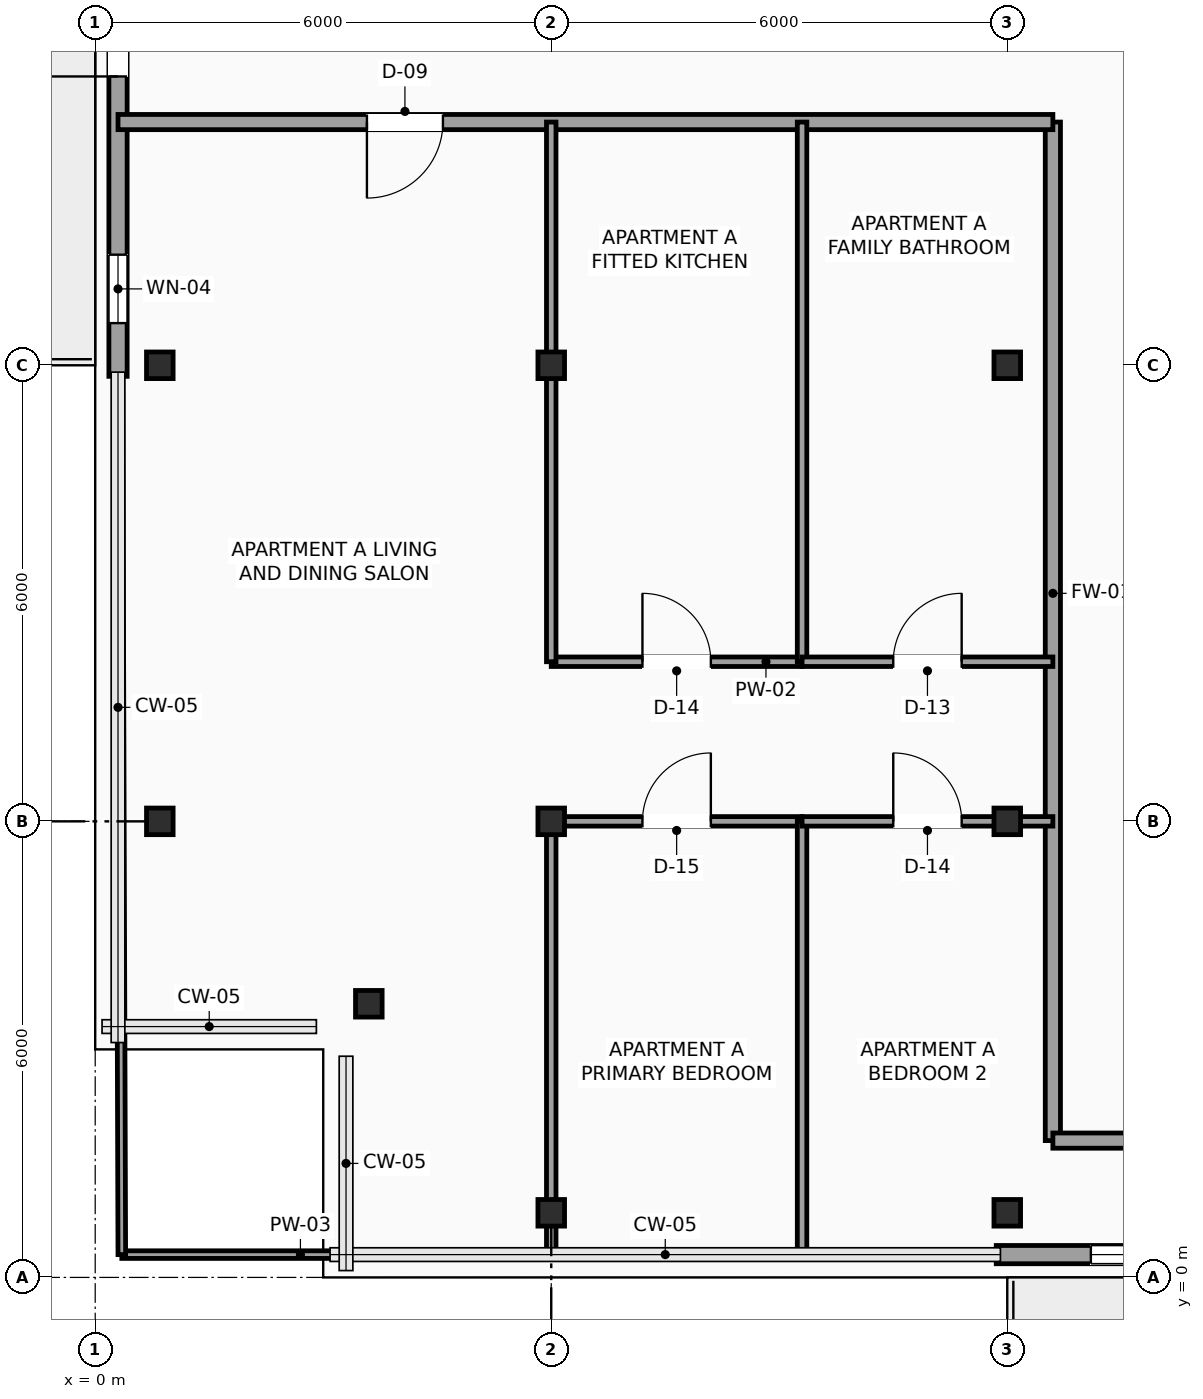
"""IFC4 building model, lengths in metres.
Left out: names, types, materials, properties, quantities, classifications, styles, units other than length and angle.
Written with IfcOpenShell. Run it as: python <this file> out.ifc"""

import sys

from ifc_helpers import new_model, si_unit, direction, frame, frame_2d, origin, origin_2d, place, context, subcontext, project, spatial, rectangle, hollow_rectangle, extrude, element, fill, save


model = new_model("IFC4")
c1 = context("Model", 3, precision=1e-05, world=origin(), true_north=direction((0.0, 1.0)))
c2 = subcontext(c1, "Body", "Model", "MODEL_VIEW")
j1 = project(units=[si_unit("LENGTHUNIT", "METRE"), si_unit("PLANEANGLEUNIT", "RADIAN")], contexts=[c1])
p1 = place(None, origin())
s1 = spatial("IfcSite", under=j1, at=p1, CompositionType="ELEMENT")
p2 = place(p1, origin())
s2 = spatial("IfcBuilding", under=s1, at=p2, CompositionType="ELEMENT")
p3 = place(p2, frame((0.0, 0.0, 250.2)))
s3 = spatial("IfcBuildingStorey", under=s2, at=p3, CompositionType="ELEMENT", Elevation=250.2)
for number, where, z_axis, x_axis in (
    (1, (3.6, 3.6, 0.0), (0.0, 0.0, 1.0), (1.0, 0.0, 0.0)),
    (2, (0.85, 6.0, 0.0), (0.0, 0.0, 1.0), (1.0, 0.0, 0.0)),
    (3, (0.85, 12.0, 0.0), (0.0, 0.0, 1.0), (1.0, 0.0, 0.0)),
    (4, (6.0, 0.85, 0.0), (0.0, 0.0, 1.0), (1.0, 0.0, 0.0)),
    (5, (6.0, 6.0, 0.0), (0.0, 0.0, 1.0), (1.0, 0.0, 0.0)),
    (6, (6.0, 12.0, 0.0), (0.0, 0.0, 1.0), (1.0, 0.0, 0.0)),
    (7, (12.0, 0.85, 0.0), (0.0, 0.0, 1.0), (1.0, 0.0, 0.0)),
    (8, (12.0, 6.0, 0.0), (0.0, 0.0, 1.0), (1.0, 0.0, 0.0)),
    (9, (12.0, 12.0, 0.0), (0.0, 0.0, 1.0), (1.0, 0.0, 0.0)),
):
    element("IfcColumn", number, at=place(p3, frame(where, z_axis=z_axis, x_axis=x_axis)), inside=s3, PredefinedType="COLUMN", context=c2, shape_type="SweptSolid", body=[
        extrude(hollow_rectangle(XDim=0.35, YDim=0.35, WallThickness=0.016, InnerFilletRadius=0.016, OuterFilletRadius=0.032, at=origin_2d()), origin(), (0.0, 0.0, 1.0), 3.5),
    ])
p4 = place(p3, frame((21.145, 0.3, 0.0), z_axis=(0.0, 0.0, 1.0), x_axis=(-1.0, 0.0, 0.0)))
e10 = element("IfcWall", 10, at=p4, inside=s3, PredefinedType="SOLIDWALL", context=c2, shape_type="SweptSolid", body=[
    extrude(rectangle(XDim=9.29, YDim=0.24, at=frame_2d((4.645, 0.0))), origin(), (0.0, 0.0, 1.0), 3.3),
])
p5 = place(p4, frame((3.945, 0.0, 0.0)))
e11 = element("IfcOpeningElement", 11, at=p5, cuts=e10, PredefinedType="OPENING", context=c2, shape_type="SweptSolid", body=[
    extrude(rectangle(XDim=1.05, YDim=2.2, at=frame_2d((0.525, 1.1))), frame((0.0, 0.13, 0.0), z_axis=(0.0, -1.0, 0.0), x_axis=(1.0, 0.0, 0.0)), (0.0, 0.0, 1.0), 0.26),
])
p6 = place(p4, frame((5.345, 0.0, 0.6)))
e12 = element("IfcOpeningElement", 12, at=p6, cuts=e10, PredefinedType="OPENING", context=c2, shape_type="SweptSolid", body=[
    extrude(rectangle(XDim=2.7, YDim=2.3, at=frame_2d((1.35, 1.15))), frame((0.0, 0.13, 0.0), z_axis=(0.0, -1.0, 0.0), x_axis=(1.0, 0.0, 0.0)), (0.0, 0.0, 1.0), 0.26),
])
p7 = place(p4, frame((1.4, 0.0, 0.6)))
e13 = element("IfcOpeningElement", 13, at=p7, cuts=e10, PredefinedType="OPENING", context=c2, shape_type="SweptSolid", body=[
    extrude(rectangle(XDim=0.9, YDim=2.2, at=frame_2d((0.45, 1.1))), frame((0.0, 0.13, 0.0), z_axis=(0.0, -1.0, 0.0), x_axis=(1.0, 0.0, 0.0)), (0.0, 0.0, 1.0), 0.26),
])
p8 = place(p3, frame((0.3, 11.855, 0.0), z_axis=(0.0, 0.0, 1.0), x_axis=(0.0, 1.0, 0.0)))
e14 = element("IfcWall", 14, at=p8, inside=s3, PredefinedType="SOLIDWALL", context=c2, shape_type="SweptSolid", body=[
    extrude(rectangle(XDim=9.29, YDim=0.24, at=frame_2d((4.645, 0.0))), origin(), (0.0, 0.0, 1.0), 3.3),
])
p9 = place(p8, frame((3.945, 0.0, 0.0)))
e15 = element("IfcOpeningElement", 15, at=p9, cuts=e14, PredefinedType="OPENING", context=c2, shape_type="SweptSolid", body=[
    extrude(rectangle(XDim=1.05, YDim=2.2, at=frame_2d((0.525, 1.1))), frame((0.0, 0.13, 0.0), z_axis=(0.0, -1.0, 0.0), x_axis=(1.0, 0.0, 0.0)), (0.0, 0.0, 1.0), 0.26),
])
p10 = place(p8, frame((6.2, 0.0, 0.6)))
e16 = element("IfcOpeningElement", 16, at=p10, cuts=e14, PredefinedType="OPENING", context=c2, shape_type="SweptSolid", body=[
    extrude(rectangle(XDim=2.7, YDim=2.3, at=frame_2d((1.35, 1.15))), frame((0.0, 0.13, 0.0), z_axis=(0.0, -1.0, 0.0), x_axis=(1.0, 0.0, 0.0)), (0.0, 0.0, 1.0), 0.26),
])
p11 = place(p8, frame((0.7, 0.0, 0.6)))
e17 = element("IfcOpeningElement", 17, at=p11, cuts=e14, PredefinedType="OPENING", context=c2, shape_type="SweptSolid", body=[
    extrude(rectangle(XDim=0.9, YDim=2.2, at=frame_2d((0.45, 1.1))), frame((0.0, 0.13, 0.0), z_axis=(0.0, -1.0, 0.0), x_axis=(1.0, 0.0, 0.0)), (0.0, 0.0, 1.0), 0.26),
])
p12 = place(p3, frame((12.6, 1.8, 0.0), z_axis=(0.0, 0.0, 1.0), x_axis=(0.0, 1.0, 0.0)))
e18 = element("IfcWall", 18, at=p12, inside=s3, PredefinedType="SOLIDWALL", context=c2, shape_type="SweptSolid", body=[
    extrude(rectangle(XDim=13.4, YDim=0.2, at=frame_2d((6.7, 0.0))), origin(), (0.0, 0.0, 1.0), 3.3),
])
p13 = place(p3, frame((12.6, 15.2, 0.0), z_axis=(0.0, 0.0, 1.0), x_axis=(-1.0, 0.0, 0.0)))
e19 = element("IfcWall", 19, at=p13, inside=s3, PredefinedType="SOLIDWALL", context=c2, shape_type="SweptSolid", body=[
    extrude(rectangle(XDim=12.3, YDim=0.2, at=frame_2d((6.15, 0.0))), origin(), (0.0, 0.0, 1.0), 2.932),
])
p14 = place(p13, frame((8.025, 0.0, 0.0)))
e20 = element("IfcOpeningElement", 20, at=p14, cuts=e19, PredefinedType="OPENING", context=c2, shape_type="SweptSolid", body=[
    extrude(rectangle(XDim=1.0, YDim=2.2, at=frame_2d((0.5, 1.1))), frame((0.0, 0.11, 0.0), z_axis=(0.0, -1.0, 0.0), x_axis=(1.0, 0.0, 0.0)), (0.0, 0.0, 1.0), 0.22),
])
p15 = place(p3, frame((14.95, 1.8, 0.0), z_axis=(0.0, 0.0, 1.0), x_axis=(-1.0, 0.0, 0.0)))
e21 = element("IfcWall", 21, at=p15, inside=s3, PredefinedType="SOLIDWALL", context=c2, shape_type="SweptSolid", body=[
    extrude(rectangle(XDim=2.35, YDim=0.2, at=frame_2d((1.175, 0.0))), origin(), (0.0, 0.0, 1.0), 3.3),
])
p16 = place(p3, frame((0.35, 0.3, 0.0), z_axis=(0.0, 0.0, 1.0), x_axis=(1.0, 0.0, 0.0)))
e22 = element("IfcWall", 22, at=p16, inside=s3, PredefinedType="PARTITIONING", context=c2, shape_type="SweptSolid", body=[
    extrude(rectangle(XDim=11.505, YDim=0.1, at=frame_2d((5.752, 0.0))), origin(), (0.0, 0.0, 1.0), 3.3),
])
p17 = place(p3, frame((0.35, 0.3, 0.0), z_axis=(0.0, 0.0, 1.0), x_axis=(-0.003359443529, 0.999994357054, 0.0)))
e23 = element("IfcWall", 23, at=p17, inside=s3, PredefinedType="PARTITIONING", context=c2, shape_type="SweptSolid", body=[
    extrude(rectangle(XDim=11.555, YDim=0.1, at=frame_2d((5.777, 0.0))), origin(), (0.0, 0.0, 1.0), 3.3),
])
p18 = place(p3, frame((6.0, 8.1, 0.0), z_axis=(0.0, 0.0, 1.0), x_axis=(1.0, 0.0, 0.0)))
e24 = element("IfcWall", 24, at=p18, inside=s3, PredefinedType="PARTITIONING", context=c2, shape_type="SweptSolid", body=[
    extrude(rectangle(XDim=3.3, YDim=0.125, at=frame_2d((1.65, 0.0))), origin(), (0.0, 0.0, 1.0), 3.3),
])
p19 = place(p18, frame((1.2, 0.0, 0.0)))
e25 = element("IfcOpeningElement", 25, at=p19, cuts=e24, PredefinedType="OPENING", context=c2, shape_type="SweptSolid", body=[
    extrude(rectangle(XDim=0.9, YDim=2.1, at=frame_2d((0.45, 1.05))), frame((0.0, 0.073, 0.0), z_axis=(0.0, -1.0, 0.0), x_axis=(1.0, 0.0, 0.0)), (0.0, 0.0, 1.0), 0.145),
])
p20 = place(p3, frame((6.0, 8.1, 0.0), z_axis=(0.0, 0.0, 1.0), x_axis=(0.0, 1.0, 0.0)))
e26 = element("IfcWall", 26, at=p20, inside=s3, PredefinedType="PARTITIONING", context=c2, shape_type="SweptSolid", body=[
    extrude(rectangle(XDim=7.1, YDim=0.125, at=frame_2d((3.55, 0.0))), origin(), (0.0, 0.0, 1.0), 2.992),
])
p21 = place(p3, frame((9.3, 8.1, 0.0), z_axis=(0.0, 0.0, 1.0), x_axis=(0.0, 1.0, 0.0)))
e27 = element("IfcWall", 27, at=p21, inside=s3, PredefinedType="PARTITIONING", context=c2, shape_type="SweptSolid", body=[
    extrude(rectangle(XDim=7.1, YDim=0.125, at=frame_2d((3.55, 0.0))), origin(), (0.0, 0.0, 1.0), 3.3),
])
p22 = place(p3, frame((9.3, 8.1, 0.0), z_axis=(0.0, 0.0, 1.0), x_axis=(1.0, 0.0, 0.0)))
e28 = element("IfcWall", 28, at=p22, inside=s3, PredefinedType="PARTITIONING", context=c2, shape_type="SweptSolid", body=[
    extrude(rectangle(XDim=3.3, YDim=0.125, at=frame_2d((1.65, 0.0))), origin(), (0.0, 0.0, 1.0), 3.3),
])
p23 = place(p22, frame((1.2, 0.0, 0.0)))
e29 = element("IfcOpeningElement", 29, at=p23, cuts=e28, PredefinedType="OPENING", context=c2, shape_type="SweptSolid", body=[
    extrude(rectangle(XDim=0.9, YDim=2.1, at=frame_2d((0.45, 1.05))), frame((0.0, 0.073, 0.0), z_axis=(0.0, -1.0, 0.0), x_axis=(1.0, 0.0, 0.0)), (0.0, 0.0, 1.0), 0.145),
])
p24 = place(p3, frame((6.0, 6.0, 0.0), z_axis=(0.0, 0.0, 1.0), x_axis=(1.0, 0.0, 0.0)))
e30 = element("IfcWall", 30, at=p24, inside=s3, PredefinedType="PARTITIONING", context=c2, shape_type="SweptSolid", body=[
    extrude(rectangle(XDim=3.3, YDim=0.125, at=frame_2d((1.65, 0.0))), origin(), (0.0, 0.0, 1.0), 2.992),
])
p25 = place(p24, frame((1.2, 0.0, 0.0)))
e31 = element("IfcOpeningElement", 31, at=p25, cuts=e30, PredefinedType="OPENING", context=c2, shape_type="SweptSolid", body=[
    extrude(rectangle(XDim=0.9, YDim=2.1, at=frame_2d((0.45, 1.05))), frame((0.0, 0.073, 0.0), z_axis=(0.0, -1.0, 0.0), x_axis=(1.0, 0.0, 0.0)), (0.0, 0.0, 1.0), 0.145),
])
p26 = place(p3, frame((6.0, 0.3, 0.0), z_axis=(0.0, 0.0, 1.0), x_axis=(0.0, 1.0, 0.0)))
e32 = element("IfcWall", 32, at=p26, inside=s3, PredefinedType="PARTITIONING", context=c2, shape_type="SweptSolid", body=[
    extrude(rectangle(XDim=5.7, YDim=0.125, at=frame_2d((2.85, 0.0))), origin(), (0.0, 0.0, 1.0), 2.992),
])
p27 = place(p3, frame((9.3, 0.3, 0.0), z_axis=(0.0, 0.0, 1.0), x_axis=(0.0, 1.0, 0.0)))
e33 = element("IfcWall", 33, at=p27, inside=s3, PredefinedType="PARTITIONING", context=c2, shape_type="SweptSolid", body=[
    extrude(rectangle(XDim=5.7, YDim=0.125, at=frame_2d((2.85, 0.0))), origin(), (0.0, 0.0, 1.0), 3.3),
])
p28 = place(p3, frame((9.3, 6.0, 0.0), z_axis=(0.0, 0.0, 1.0), x_axis=(1.0, 0.0, 0.0)))
e34 = element("IfcWall", 34, at=p28, inside=s3, PredefinedType="PARTITIONING", context=c2, shape_type="SweptSolid", body=[
    extrude(rectangle(XDim=3.3, YDim=0.125, at=frame_2d((1.65, 0.0))), origin(), (0.0, 0.0, 1.0), 2.992),
])
p29 = place(p28, frame((1.2, 0.0, 0.0)))
e35 = element("IfcOpeningElement", 35, at=p29, cuts=e34, PredefinedType="OPENING", context=c2, shape_type="SweptSolid", body=[
    extrude(rectangle(XDim=0.9, YDim=2.1, at=frame_2d((0.45, 1.05))), frame((0.0, 0.073, 0.0), z_axis=(0.0, -1.0, 0.0), x_axis=(1.0, 0.0, 0.0)), (0.0, 0.0, 1.0), 0.145),
])
p30 = place(p6, origin())
e36 = element("IfcWindow", 36, at=p30, inside=s3, PartitioningType="SINGLE_PANEL", PredefinedType="WINDOW", context=c2, shape_type="SweptSolid", body=[
    extrude(rectangle(XDim=2.7, YDim=2.3, at=frame_2d((1.35, 1.15))), frame((0.0, 0.03, 0.0), z_axis=(0.0, -1.0, 0.0), x_axis=(1.0, 0.0, 0.0)), (0.0, 0.0, 1.0), 0.06),
])
fill(e12, e36)
p31 = place(p9, origin())
e37 = element("IfcDoor", 37, at=p31, inside=s3, OperationType="SINGLE_SWING_LEFT", PredefinedType="DOOR", context=c2, shape_type="SweptSolid", body=[
    extrude(rectangle(XDim=1.05, YDim=2.2, at=frame_2d((0.525, 1.1))), frame((0.0, 0.025, 0.0), z_axis=(0.0, -1.0, 0.0), x_axis=(1.0, 0.0, 0.0)), (0.0, 0.0, 1.0), 0.05),
])
fill(e15, e37)
p32 = place(p11, origin())
e38 = element("IfcWindow", 38, at=p32, inside=s3, PartitioningType="SINGLE_PANEL", PredefinedType="WINDOW", context=c2, shape_type="SweptSolid", body=[
    extrude(rectangle(XDim=0.9, YDim=2.2, at=frame_2d((0.45, 1.1))), frame((0.0, 0.03, 0.0), z_axis=(0.0, -1.0, 0.0), x_axis=(1.0, 0.0, 0.0)), (0.0, 0.0, 1.0), 0.06),
])
fill(e17, e38)
p33 = place(p14, origin())
e39 = element("IfcDoor", 39, at=p33, inside=s3, OperationType="SINGLE_SWING_RIGHT", PredefinedType="DOOR", context=c2, shape_type="SweptSolid", body=[
    extrude(rectangle(XDim=1.0, YDim=2.2, at=frame_2d((0.5, 1.1))), frame((0.0, 0.025, 0.0), z_axis=(0.0, -1.0, 0.0), x_axis=(1.0, 0.0, 0.0)), (0.0, 0.0, 1.0), 0.05),
])
fill(e20, e39)
p34 = place(p19, origin())
e40 = element("IfcDoor", 40, at=p34, inside=s3, OperationType="SINGLE_SWING_LEFT", PredefinedType="DOOR", context=c2, shape_type="SweptSolid", body=[
    extrude(rectangle(XDim=0.9, YDim=2.1, at=frame_2d((0.45, 1.05))), frame((0.0, 0.025, 0.0), z_axis=(0.0, -1.0, 0.0), x_axis=(1.0, 0.0, 0.0)), (0.0, 0.0, 1.0), 0.05),
])
fill(e25, e40)
p35 = place(p23, origin())
e41 = element("IfcDoor", 41, at=p35, inside=s3, OperationType="SINGLE_SWING_RIGHT", PredefinedType="DOOR", context=c2, shape_type="SweptSolid", body=[
    extrude(rectangle(XDim=0.9, YDim=2.1, at=frame_2d((0.45, 1.05))), frame((0.0, 0.025, 0.0), z_axis=(0.0, -1.0, 0.0), x_axis=(1.0, 0.0, 0.0)), (0.0, 0.0, 1.0), 0.05),
])
fill(e29, e41)
p36 = place(p25, origin())
e42 = element("IfcDoor", 42, at=p36, inside=s3, OperationType="SINGLE_SWING_RIGHT", PredefinedType="DOOR", context=c2, shape_type="SweptSolid", body=[
    extrude(rectangle(XDim=0.9, YDim=2.1, at=frame_2d((0.45, 1.05))), frame((0.0, 0.025, 0.0), z_axis=(0.0, -1.0, 0.0), x_axis=(1.0, 0.0, 0.0)), (0.0, 0.0, 1.0), 0.05),
])
fill(e31, e42)
p37 = place(p29, origin())
e43 = element("IfcDoor", 43, at=p37, inside=s3, OperationType="SINGLE_SWING_LEFT", PredefinedType="DOOR", context=c2, shape_type="SweptSolid", body=[
    extrude(rectangle(XDim=0.9, YDim=2.1, at=frame_2d((0.45, 1.05))), frame((0.0, 0.025, 0.0), z_axis=(0.0, -1.0, 0.0), x_axis=(1.0, 0.0, 0.0)), (0.0, 0.0, 1.0), 0.05),
])
fill(e35, e43)
save(model, sys.argv[1])
